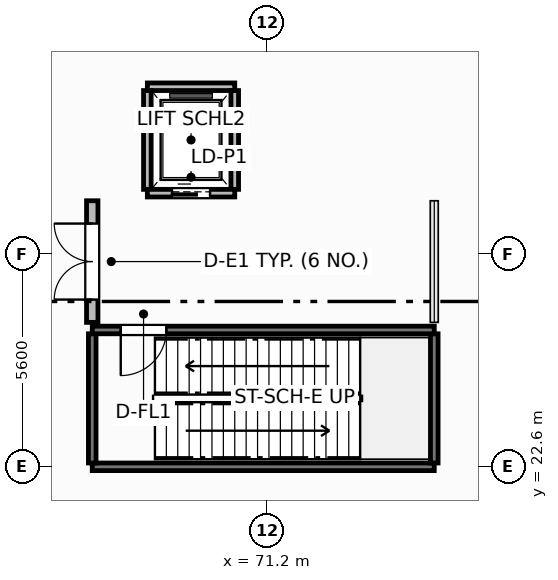
"""IFC4 building model, lengths in metres.
Left out: names, types, materials, properties, quantities, classifications, styles, units other than length and angle.
Written with IfcOpenShell. Run it as: python <this file> out.ifc"""

import sys

from ifc_helpers import new_model, si_unit, direction, frame, frame_2d, origin, place, context, subcontext, project, spatial, rectangle, extrude, element, fill, save


model = new_model("IFC4")
c1 = context("Model", 3, precision=1e-05, world=origin(), true_north=direction((0.0, 1.0)))
c2 = subcontext(c1, "Body", "Model", "MODEL_VIEW")
j1 = project(units=[si_unit("LENGTHUNIT", "METRE"), si_unit("PLANEANGLEUNIT", "RADIAN")], contexts=[c1])
p1 = place(None, origin())
s1 = spatial("IfcSite", under=j1, at=p1, CompositionType="ELEMENT")
p2 = place(p1, origin())
s2 = spatial("IfcBuilding", under=s1, at=p2, CompositionType="ELEMENT")
p3 = place(p2, origin())
s3 = spatial("IfcBuildingStorey", under=s2, at=p3, CompositionType="ELEMENT", Elevation=0.0)
p4 = place(p3, frame((66.6, 26.4, 0.0), z_axis=(0.0, 0.0, 1.0), x_axis=(0.0, 1.0, 0.0)))
e1 = element("IfcWall", 1, at=p4, inside=s3, PredefinedType="SOLIDWALL", context=c2, shape_type="SweptSolid", body=[
    extrude(rectangle(XDim=3.2, YDim=0.3, at=frame_2d((1.6, 0.0))), origin(), (0.0, 0.0, 1.0), 5.58),
])
p5 = place(p4, frame((0.6, 0.0, 0.0)))
e2 = element("IfcOpeningElement", 2, at=p5, cuts=e1, PredefinedType="OPENING", context=c2, shape_type="SweptSolid", body=[
    extrude(rectangle(XDim=2.0, YDim=2.45, at=frame_2d((1.0, 1.225))), frame((0.0, 0.16, 0.0), z_axis=(0.0, -1.0, 0.0), x_axis=(1.0, 0.0, 0.0)), (0.0, 0.0, 1.0), 0.32),
])
p6 = place(p3, frame((66.6, 22.6, 0.0), z_axis=(0.0, 0.0, 1.0), x_axis=(1.0, 0.0, 0.0)))
e3 = element("IfcWall", 3, at=p6, inside=s3, PredefinedType="SHEAR", context=c2, shape_type="SweptSolid", body=[
    extrude(rectangle(XDim=9.0, YDim=0.2, at=frame_2d((4.5, 0.0))), origin(), (0.0, 0.0, 1.0), 6.6),
])
for number, where, z_axis, x_axis in (
    (4, (66.6, 22.7, 0.0), (0.0, 0.0, 1.0), (0.0, 1.0, 0.0)),
    (5, (75.6, 22.7, 0.0), (0.0, 0.0, 1.0), (0.0, 1.0, 0.0)),
):
    element("IfcWall", number, at=place(p3, frame(where, z_axis=z_axis, x_axis=x_axis)), inside=s3, PredefinedType="SHEAR", context=c2, shape_type="SweptSolid", body=[
        extrude(rectangle(XDim=3.4, YDim=0.2, at=frame_2d((1.7, 0.0))), origin(), (0.0, 0.0, 1.0), 6.6),
    ])
p7 = place(p3, frame((75.6, 26.2, 0.0), z_axis=(0.0, 0.0, 1.0), x_axis=(-1.0, 0.0, 0.0)))
e6 = element("IfcWall", 6, at=p7, inside=s3, PredefinedType="SHEAR", context=c2, shape_type="SweptSolid", body=[
    extrude(rectangle(XDim=9.0, YDim=0.2, at=frame_2d((4.5, 0.0))), origin(), (0.0, 0.0, 1.0), 6.6),
])
p8 = place(p7, frame((7.05, 0.0, 0.0)))
e7 = element("IfcOpeningElement", 7, at=p8, cuts=e6, PredefinedType="OPENING", context=c2, shape_type="SweptSolid", body=[
    extrude(rectangle(XDim=1.2, YDim=2.15, at=frame_2d((0.6, 1.075))), frame((0.0, 0.11, 0.0), z_axis=(0.0, -1.0, 0.0), x_axis=(1.0, 0.0, 0.0)), (0.0, 0.0, 1.0), 0.22),
])
p9 = place(p3, frame((68.05, 32.6, 0.0), z_axis=(0.0, 0.0, 1.0), x_axis=(1.0, 0.0, 0.0)))
e8 = element("IfcWall", 8, at=p9, inside=s3, PredefinedType="PARTITIONING", context=c2, shape_type="SweptSolid", body=[
    extrude(rectangle(XDim=2.3, YDim=0.2, at=frame_2d((1.15, 0.0))), origin(), (0.0, 0.0, 1.0), 5.52),
])
for number, where, z_axis, x_axis in (
    (9, (68.05, 29.9, 0.0), (0.0, 0.0, 1.0), (0.0, 1.0, 0.0)),
    (10, (70.35, 29.9, 0.0), (0.0, 0.0, 1.0), (0.0, 1.0, 0.0)),
):
    element("IfcWall", number, at=place(p3, frame(where, z_axis=z_axis, x_axis=x_axis)), inside=s3, PredefinedType="PARTITIONING", context=c2, shape_type="SweptSolid", body=[
        extrude(rectangle(XDim=2.6, YDim=0.2, at=frame_2d((1.3, 0.0))), origin(), (0.0, 0.0, 1.0), 5.52),
    ])
p10 = place(p3, frame((68.05, 29.8, 0.0), z_axis=(0.0, 0.0, 1.0), x_axis=(1.0, 0.0, 0.0)))
e11 = element("IfcWall", 11, at=p10, inside=s3, PredefinedType="PARTITIONING", context=c2, shape_type="SweptSolid", body=[
    extrude(rectangle(XDim=2.3, YDim=0.2, at=frame_2d((1.15, 0.0))), origin(), (0.0, 0.0, 1.0), 5.52),
])
p11 = place(p10, frame((0.65, 0.0, 0.0)))
e12 = element("IfcOpeningElement", 12, at=p11, cuts=e11, PredefinedType="OPENING", context=c2, shape_type="SweptSolid", body=[
    extrude(rectangle(XDim=1.0, YDim=2.15, at=frame_2d((0.5, 1.075))), frame((0.0, 0.11, 0.0), z_axis=(0.0, -1.0, 0.0), x_axis=(1.0, 0.0, 0.0)), (0.0, 0.0, 1.0), 0.22),
])
p12 = place(p5, origin())
e13 = element("IfcDoor", 13, at=p12, inside=s3, OperationType="DOUBLE_DOOR_SINGLE_SWING", PredefinedType="DOOR", context=c2, shape_type="SweptSolid", body=[
    extrude(rectangle(XDim=2.0, YDim=2.45, at=frame_2d((1.0, 1.225))), frame((0.0, 0.025, 0.0), z_axis=(0.0, -1.0, 0.0), x_axis=(1.0, 0.0, 0.0)), (0.0, 0.0, 1.0), 0.05),
])
fill(e2, e13)
p13 = place(p8, origin())
e14 = element("IfcDoor", 14, at=p13, inside=s3, OperationType="SINGLE_SWING_RIGHT", PredefinedType="DOOR", context=c2, shape_type="SweptSolid", body=[
    extrude(rectangle(XDim=1.2, YDim=2.15, at=frame_2d((0.6, 1.075))), frame((0.0, 0.025, 0.0), z_axis=(0.0, -1.0, 0.0), x_axis=(1.0, 0.0, 0.0)), (0.0, 0.0, 1.0), 0.05),
])
fill(e7, e14)
p14 = place(p11, origin())
e15 = element("IfcDoor", 15, at=p14, inside=s3, OperationType="SLIDING_TO_LEFT", PredefinedType="DOOR", context=c2, shape_type="SweptSolid", body=[
    extrude(rectangle(XDim=1.0, YDim=2.15, at=frame_2d((0.5, 1.075))), frame((0.0, 0.025, 0.0), z_axis=(0.0, -1.0, 0.0), x_axis=(1.0, 0.0, 0.0)), (0.0, 0.0, 1.0), 0.05),
])
fill(e12, e15)
save(model, sys.argv[1])
